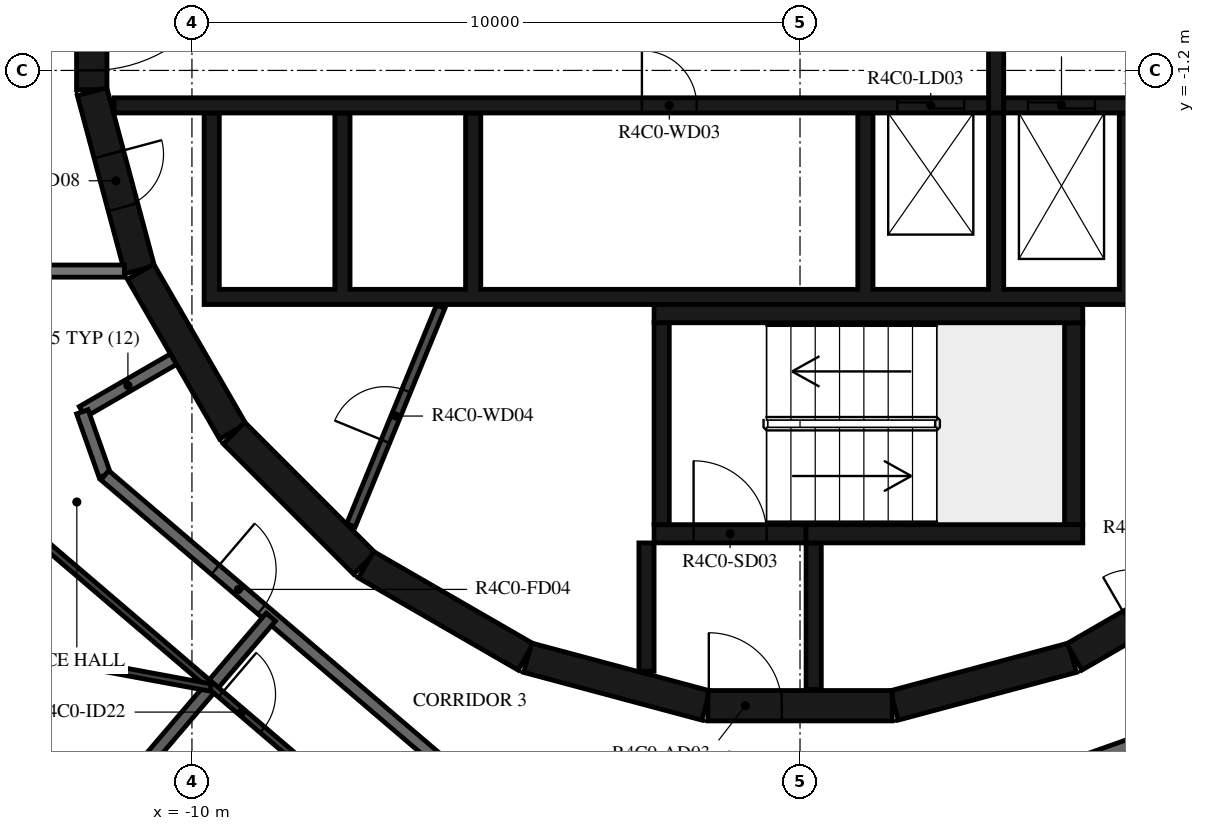
"""IFC4 building model, lengths in metres.
Left out: names, types, materials, properties, quantities, classifications, styles, units other than length and angle.
Written with IfcOpenShell. Run it as: python <this file> out.ifc"""

import sys

from ifc_helpers import new_model, si_unit, direction, frame, frame_2d, origin, place, context, subcontext, project, spatial, polyline, rectangle, outline, extrude, element, fill, save


model = new_model("IFC4")
c1 = context("Model", 3, precision=1e-05, world=origin(), true_north=direction((0.0, 1.0)))
c2 = subcontext(c1, "Body", "Model", "MODEL_VIEW")
j1 = project(units=[si_unit("LENGTHUNIT", "METRE"), si_unit("PLANEANGLEUNIT", "RADIAN")], contexts=[c1])
p1 = place(None, origin())
s1 = spatial("IfcSite", under=j1, at=p1, CompositionType="ELEMENT")
p2 = place(p1, origin())
s2 = spatial("IfcBuilding", under=s1, at=p2, CompositionType="ELEMENT")
p3 = place(p2, frame((0.0, 0.0, 172.7)))
s3 = spatial("IfcBuildingStorey", under=s2, at=p3, CompositionType="ELEMENT", Elevation=172.7)
p4 = place(p3, frame((1.55, -11.643, 0.0), z_axis=(0.0, 0.0, 1.0), x_axis=(0.965948410781, 0.258734743916, 0.0)))
e1 = element("IfcWall", 1, at=p4, inside=s3, PredefinedType="SHEAR", context=c2, shape_type="SweptSolid", body=[
    extrude(rectangle(XDim=3.033, YDim=0.5, at=frame_2d((1.516, 0.0))), origin(), (0.0, 0.0, 1.0), 3.12),
])
p5 = place(p3, frame((4.51, -10.845, 0.0), z_axis=(0.0, 0.0, 1.0), x_axis=(0.865975092491, 0.500087131594, 0.0)))
e2 = element("IfcWall", 2, at=p5, inside=s3, PredefinedType="SHEAR", context=c2, shape_type="SweptSolid", body=[
    extrude(rectangle(XDim=3.033, YDim=0.5, at=frame_2d((1.516, 0.0))), origin(), (0.0, 0.0, 1.0), 3.12),
])
p6 = place(p5, frame((1.066, 0.0, 0.0)))
e3 = element("IfcOpeningElement", 3, at=p6, cuts=e2, PredefinedType="OPENING", context=c2, shape_type="SweptSolid", body=[
    extrude(rectangle(XDim=0.9, YDim=2.1, at=frame_2d((0.45, 1.05))), frame((0.0, 0.26, 0.0), z_axis=(0.0, -1.0, 0.0), x_axis=(1.0, 0.0, 0.0)), (0.0, 0.0, 1.0), 0.52),
])
p7 = place(p3, frame((-11.647, 1.516, 0.0), z_axis=(0.0, 0.0, 1.0), x_axis=(0.0, -1.0, 0.0)))
e4 = element("IfcWall", 4, at=p7, inside=s3, PredefinedType="SHEAR", context=c2, shape_type="SweptSolid", body=[
    extrude(rectangle(XDim=3.033, YDim=0.5, at=frame_2d((1.516, 0.0))), origin(), (0.0, 0.0, 1.0), 3.12),
])
p8 = place(p7, frame((0.316, 0.0, 0.0)))
e5 = element("IfcOpeningElement", 5, at=p8, cuts=e4, PredefinedType="OPENING", context=c2, shape_type="SweptSolid", body=[
    extrude(rectangle(XDim=2.4, YDim=2.1, at=frame_2d((1.2, 1.05))), frame((0.0, 0.26, 0.0), z_axis=(0.0, -1.0, 0.0), x_axis=(1.0, 0.0, 0.0)), (0.0, 0.0, 1.0), 0.52),
])
p9 = place(p3, frame((-11.643, -1.55, 0.0), z_axis=(0.0, 0.0, 1.0), x_axis=(0.258734743916, -0.965948410781, 0.0)))
e6 = element("IfcWall", 6, at=p9, inside=s3, PredefinedType="SHEAR", context=c2, shape_type="SweptSolid", body=[
    extrude(rectangle(XDim=3.033, YDim=0.5, at=frame_2d((1.516, 0.0))), origin(), (0.0, 0.0, 1.0), 3.12),
])
p10 = place(p9, frame((1.066, 0.0, 0.0)))
e7 = element("IfcOpeningElement", 7, at=p10, cuts=e6, PredefinedType="OPENING", context=c2, shape_type="SweptSolid", body=[
    extrude(rectangle(XDim=0.9, YDim=2.1, at=frame_2d((0.45, 1.05))), frame((0.0, 0.26, 0.0), z_axis=(0.0, -1.0, 0.0), x_axis=(1.0, 0.0, 0.0)), (0.0, 0.0, 1.0), 0.52),
])
p11 = place(p3, frame((-10.845, -4.51, 0.0), z_axis=(0.0, 0.0, 1.0), x_axis=(0.500087131594, -0.865975092491, 0.0)))
e8 = element("IfcWall", 8, at=p11, inside=s3, PredefinedType="SHEAR", context=c2, shape_type="SweptSolid", body=[
    extrude(rectangle(XDim=3.033, YDim=0.5, at=frame_2d((1.516, 0.0))), origin(), (0.0, 0.0, 1.0), 3.12),
])
p12 = place(p3, frame((-9.308, -7.164, 0.0), z_axis=(0.0, 0.0, 1.0), x_axis=(0.707106781187, -0.707106781187, 0.0)))
e9 = element("IfcWall", 9, at=p12, inside=s3, PredefinedType="SHEAR", context=c2, shape_type="SweptSolid", body=[
    extrude(rectangle(XDim=3.032, YDim=0.5, at=frame_2d((1.516, 0.0))), origin(), (0.0, 0.0, 1.0), 3.12),
])
for number, where, z_axis, x_axis in (
    (10, (-7.137, -9.329, 0.0), (0.0, 0.0, 1.0), (0.866, -0.5, 0.0)),
    (11, (-4.479, -10.858, 0.0), (0.0, 0.0, 1.0), (0.966, -0.259, 0.0)),
):
    element("IfcWall", number, at=place(p3, frame(where, z_axis=z_axis, x_axis=x_axis)), inside=s3, PredefinedType="SHEAR", context=c2, shape_type="SweptSolid", body=[
        extrude(rectangle(XDim=3.033, YDim=0.5, at=frame_2d((1.516, 0.0))), origin(), (0.0, 0.0, 1.0), 3.12),
    ])
p13 = place(p3, frame((-1.516, -11.647, 0.0), z_axis=(0.0, 0.0, 1.0), x_axis=(1.0, 0.0, 0.0)))
e12 = element("IfcWall", 12, at=p13, inside=s3, PredefinedType="SHEAR", context=c2, shape_type="SweptSolid", body=[
    extrude(rectangle(XDim=3.033, YDim=0.5, at=frame_2d((1.516, 0.0))), origin(), (0.0, 0.0, 1.0), 3.12),
])
p14 = place(p13, frame((0.016, 0.0, 0.0)))
e13 = element("IfcOpeningElement", 13, at=p14, cuts=e12, PredefinedType="OPENING", context=c2, shape_type="SweptSolid", body=[
    extrude(rectangle(XDim=1.2, YDim=2.1, at=frame_2d((0.6, 1.05))), frame((0.0, 0.26, 0.0), z_axis=(0.0, -1.0, 0.0), x_axis=(1.0, 0.0, 0.0)), (0.0, 0.0, 1.0), 0.52),
])
p15 = place(p3, frame((-2.275, -8.67, 0.0), z_axis=(0.0, 0.0, 1.0), x_axis=(0.0, 1.0, 0.0)))
e14 = element("IfcWall", 14, at=p15, inside=s3, PredefinedType="SHEAR", context=c2, shape_type="SweptSolid", body=[
    extrude(rectangle(XDim=3.32, YDim=0.25, at=frame_2d((1.66, 0.0))), origin(), (0.0, 0.0, 1.0), 3.12),
])
p16 = place(p3, frame((-2.4, -5.2, 0.0), z_axis=(0.0, 0.0, 1.0), x_axis=(1.0, 0.0, 0.0)))
e15 = element("IfcWall", 15, at=p16, inside=s3, PredefinedType="SHEAR", context=c2, shape_type="SweptSolid", body=[
    extrude(rectangle(XDim=7.05, YDim=0.3, at=frame_2d((3.525, 0.0))), origin(), (0.0, 0.0, 1.0), 3.12),
])
p17 = place(p3, frame((4.5, -8.67, 0.0), z_axis=(0.0, 0.0, 1.0), x_axis=(0.0, 1.0, 0.0)))
e16 = element("IfcWall", 16, at=p17, inside=s3, PredefinedType="SHEAR", context=c2, shape_type="SweptSolid", body=[
    extrude(rectangle(XDim=3.32, YDim=0.3, at=frame_2d((1.66, 0.0))), origin(), (0.0, 0.0, 1.0), 3.12),
])
p18 = place(p3, frame((0.1, -8.82, 0.0), z_axis=(0.0, 0.0, 1.0), x_axis=(1.0, 0.0, 0.0)))
e17 = element("IfcWall", 17, at=p18, inside=s3, PredefinedType="SHEAR", context=c2, shape_type="SweptSolid", body=[
    extrude(rectangle(XDim=4.55, YDim=0.3, at=frame_2d((2.275, 0.0))), origin(), (0.0, 0.0, 1.0), 3.12),
])
p19 = place(p3, frame((-2.4, -8.82, 0.0), z_axis=(0.0, 0.0, 1.0), x_axis=(1.0, 0.0, 0.0)))
e18 = element("IfcWall", 18, at=p19, inside=s3, PredefinedType="SHEAR", context=c2, shape_type="SweptSolid", body=[
    extrude(rectangle(XDim=2.5, YDim=0.3, at=frame_2d((1.25, 0.0))), origin(), (0.0, 0.0, 1.0), 3.12),
])
p20 = place(p19, frame((0.65, 0.0, 0.0)))
e19 = element("IfcOpeningElement", 19, at=p20, cuts=e18, PredefinedType="OPENING", context=c2, shape_type="SweptSolid", body=[
    extrude(rectangle(XDim=1.2, YDim=2.1, at=frame_2d((0.6, 1.05))), frame((0.0, 0.16, 0.0), z_axis=(0.0, -1.0, 0.0), x_axis=(1.0, 0.0, 0.0)), (0.0, 0.0, 1.0), 0.32),
])
p21 = place(p3, frame((-2.525, -8.97, 0.0), z_axis=(0.0, 0.0, 1.0), x_axis=(0.0, -1.0, 0.0)))
e20 = element("IfcWall", 20, at=p21, inside=s3, PredefinedType="SHEAR", context=c2, shape_type="SweptSolid", body=[
    extrude(rectangle(XDim=2.11, YDim=0.25, at=frame_2d((1.055, 0.0))), origin(), (0.0, 0.0, 1.0), 3.12),
])
p22 = place(p3, frame((0.225, -8.97, 0.0), z_axis=(0.0, 0.0, 1.0), x_axis=(0.0, -1.0, 0.0)))
e21 = element("IfcWall", 21, at=p22, inside=s3, PredefinedType="SHEAR", context=c2, shape_type="SweptSolid", body=[
    extrude(rectangle(XDim=2.41, YDim=0.25, at=frame_2d((1.205, 0.0))), origin(), (0.0, 0.0, 1.0), 3.12),
])
p23 = place(p3, origin())
e22 = element("IfcWall", 22, at=p23, inside=s3, PredefinedType="SHEAR", context=c2, shape_type="SweptSolid", body=[
    extrude(outline(polyline([(9.8, -5.05), (9.8, -4.8), (9.8, -1.9), (9.55, -1.9), (9.55, -4.8), (7.65, -4.8), (7.65, -1.9), (7.4, -1.9), (7.4, -4.8), (5.5, -4.8), (5.5, -1.9), (5.25, -1.9), (5.25, -4.8), (3.35, -4.8), (3.35, -1.9), (3.1, -1.9), (3.1, -4.8), (1.2, -4.8), (1.2, -1.9), (0.95, -1.9), (0.95, -4.8), (-5.25, -4.8), (-5.25, -1.9), (-5.5, -1.9), (-5.5, -4.8), (-7.4, -4.8), (-7.4, -1.9), (-7.65, -1.9), (-7.65, -4.8), (-9.55, -4.8), (-9.55, -1.9), (-9.8, -1.9), (-9.8, -4.8), (-9.8, -5.05), (9.8, -5.05)])), origin(), (0.0, 0.0, 1.0), 3.12),
])
p24 = place(p3, frame((-11.28, -1.775, 0.0), z_axis=(0.0, 0.0, 1.0), x_axis=(1.0, 0.0, 0.0)))
e23 = element("IfcWall", 23, at=p24, inside=s3, PredefinedType="SHEAR", context=c2, shape_type="SweptSolid", body=[
    extrude(rectangle(XDim=14.38, YDim=0.25, at=frame_2d((7.19, 0.0))), origin(), (0.0, 0.0, 1.0), 3.12),
])
p25 = place(p24, frame((12.88, 0.0, 0.0)))
e24 = element("IfcOpeningElement", 24, at=p25, cuts=e23, PredefinedType="OPENING", context=c2, shape_type="SweptSolid", body=[
    extrude(rectangle(XDim=1.1, YDim=2.1, at=frame_2d((0.55, 1.05))), frame((0.0, 0.135, 0.0), z_axis=(0.0, -1.0, 0.0), x_axis=(1.0, 0.0, 0.0)), (0.0, 0.0, 1.0), 0.27),
])
p26 = place(p24, frame((8.68, 0.0, 0.0)))
e25 = element("IfcOpeningElement", 25, at=p26, cuts=e23, PredefinedType="OPENING", context=c2, shape_type="SweptSolid", body=[
    extrude(rectangle(XDim=0.9, YDim=2.1, at=frame_2d((0.45, 1.05))), frame((0.0, 0.135, 0.0), z_axis=(0.0, -1.0, 0.0), x_axis=(1.0, 0.0, 0.0)), (0.0, 0.0, 1.0), 0.27),
])
p27 = place(p3, frame((3.35, -1.775, 0.0), z_axis=(0.0, 0.0, 1.0), x_axis=(1.0, 0.0, 0.0)))
e26 = element("IfcWall", 26, at=p27, inside=s3, PredefinedType="SHEAR", context=c2, shape_type="SweptSolid", body=[
    extrude(rectangle(XDim=7.93, YDim=0.25, at=frame_2d((3.965, 0.0))), origin(), (0.0, 0.0, 1.0), 3.12),
])
p28 = place(p27, frame((0.4, 0.0, 0.0)))
e27 = element("IfcOpeningElement", 27, at=p28, cuts=e26, PredefinedType="OPENING", context=c2, shape_type="SweptSolid", body=[
    extrude(rectangle(XDim=1.1, YDim=2.4, at=frame_2d((0.55, 1.2))), frame((0.0, 0.135, 0.0), z_axis=(0.0, -1.0, 0.0), x_axis=(1.0, 0.0, 0.0)), (0.0, 0.0, 1.0), 0.27),
])
p29 = place(p27, frame((2.55, 0.0, 0.0)))
e28 = element("IfcOpeningElement", 28, at=p29, cuts=e26, PredefinedType="OPENING", context=c2, shape_type="SweptSolid", body=[
    extrude(rectangle(XDim=1.1, YDim=2.4, at=frame_2d((0.55, 1.2))), frame((0.0, 0.135, 0.0), z_axis=(0.0, -1.0, 0.0), x_axis=(1.0, 0.0, 0.0)), (0.0, 0.0, 1.0), 0.27),
])
p30 = place(p27, frame((4.7, 0.0, 0.0)))
e29 = element("IfcOpeningElement", 29, at=p30, cuts=e26, PredefinedType="OPENING", context=c2, shape_type="SweptSolid", body=[
    extrude(rectangle(XDim=1.1, YDim=2.4, at=frame_2d((0.55, 1.2))), frame((0.0, 0.135, 0.0), z_axis=(0.0, -1.0, 0.0), x_axis=(1.0, 0.0, 0.0)), (0.0, 0.0, 1.0), 0.27),
])
p31 = place(p3, frame((3.225, -1.9, 0.0), z_axis=(0.0, 0.0, 1.0), x_axis=(0.0, 1.0, 0.0)))
e30 = element("IfcWall", 30, at=p31, inside=s3, PredefinedType="SHEAR", context=c2, shape_type="SweptSolid", body=[
    extrude(rectangle(XDim=3.8, YDim=0.25, at=frame_2d((1.9, 0.0))), origin(), (0.0, 0.0, 1.0), 3.12),
])
p32 = place(p3, frame((-7.385, -8.681, 0.0), z_axis=(0.0, 0.0, 1.0), x_axis=(0.379804590409, 0.925066739811, 0.0)))
e31 = element("IfcWall", 31, at=p32, inside=s3, PredefinedType="PARTITIONING", context=c2, shape_type="SweptSolid", body=[
    extrude(rectangle(XDim=3.885, YDim=0.15, at=frame_2d((1.942, 0.0))), origin(), (0.0, 0.0, 1.0), 3.12),
])
p33 = place(p32, frame((1.493, 0.0, 0.0)))
e32 = element("IfcOpeningElement", 32, at=p33, cuts=e31, PredefinedType="OPENING", context=c2, shape_type="SweptSolid", body=[
    extrude(rectangle(XDim=0.9, YDim=2.1, at=frame_2d((0.45, 1.05))), frame((0.0, 0.085, 0.0), z_axis=(0.0, -1.0, 0.0), x_axis=(1.0, 0.0, 0.0)), (0.0, 0.0, 1.0), 0.17),
])
p34 = place(p3, frame((-10.303, -5.949, 0.0), z_axis=(0.0, 0.0, 1.0), x_axis=(-0.866021168401, -0.500007335828, 0.0)))
e33 = element("IfcWall", 33, at=p34, inside=s3, PredefinedType="STANDARD", context=c2, shape_type="SweptSolid", body=[
    extrude(rectangle(XDim=1.731, YDim=0.2, at=frame_2d((0.865, 0.0))), origin(), (0.0, 0.0, 1.0), 3.12),
])
p35 = place(p3, frame((-11.802, -6.814, 0.0), z_axis=(0.0, 0.0, 1.0), x_axis=(0.333904297771, -0.942606980629, 0.0)))
e34 = element("IfcWall", 34, at=p35, inside=s3, PredefinedType="STANDARD", context=c2, shape_type="SweptSolid", body=[
    extrude(rectangle(XDim=1.107, YDim=0.2, at=frame_2d((0.553, 0.0))), origin(), (0.0, 0.0, 1.0), 3.12),
])
p36 = place(p3, frame((-11.433, -7.858, 0.0), z_axis=(0.0, 0.0, 1.0), x_axis=(0.760412154545, -0.649440801937, 0.0)))
e35 = element("IfcWall", 35, at=p36, inside=s3, PredefinedType="STANDARD", context=c2, shape_type="SweptSolid", body=[
    extrude(rectangle(XDim=7.181, YDim=0.2, at=frame_2d((3.59, 0.0))), origin(), (0.0, 0.0, 1.0), 3.12),
])
p37 = place(p36, frame((2.39, 0.0, 0.0)))
e36 = element("IfcOpeningElement", 36, at=p37, cuts=e35, PredefinedType="OPENING", context=c2, shape_type="SweptSolid", body=[
    extrude(rectangle(XDim=1.0, YDim=2.1, at=frame_2d((0.5, 1.05))), frame((0.0, 0.11, 0.0), z_axis=(0.0, -1.0, 0.0), x_axis=(1.0, 0.0, 0.0)), (0.0, 0.0, 1.0), 0.22),
])
p38 = place(p3, frame((1.088, -13.83, 0.0), z_axis=(0.0, 0.0, 1.0), x_axis=(0.942648397945, 0.333787354241, 0.0)))
e37 = element("IfcWall", 37, at=p38, inside=s3, PredefinedType="STANDARD", context=c2, shape_type="SweptSolid", body=[
    extrude(rectangle(XDim=7.181, YDim=0.2, at=frame_2d((3.591, 0.0))), origin(), (0.0, 0.0, 1.0), 3.12),
])
p39 = place(p38, frame((0.2, 0.0, 0.0)))
e38 = element("IfcOpeningElement", 38, at=p39, cuts=e37, PredefinedType="OPENING", context=c2, shape_type="SweptSolid", body=[
    extrude(rectangle(XDim=1.0, YDim=2.1, at=frame_2d((0.5, 1.05))), frame((0.0, 0.11, 0.0), z_axis=(0.0, -1.0, 0.0), x_axis=(1.0, 0.0, 0.0)), (0.0, 0.0, 1.0), 0.22),
])
p40 = place(p3, frame((-17.9, -4.5, 0.0), z_axis=(0.0, 0.0, 1.0), x_axis=(1.0, 0.0, 0.0)))
e39 = element("IfcWall", 39, at=p40, inside=s3, PredefinedType="STANDARD", context=c2, shape_type="SweptSolid", body=[
    extrude(rectangle(XDim=6.789, YDim=0.2, at=frame_2d((3.394, 0.0))), origin(), (0.0, 0.0, 1.0), 3.12),
])
p41 = place(p3, frame((-11.838, -13.86, 0.0), z_axis=(0.0, 0.0, 1.0), x_axis=(0.64944503311, 0.760408540831, 0.0)))
e40 = element("IfcWall", 40, at=p41, inside=s3, PredefinedType="STANDARD", context=c2, shape_type="SweptSolid", body=[
    extrude(rectangle(XDim=4.827, YDim=0.2, at=frame_2d((2.414, 0.0))), origin(), (0.0, 0.0, 1.0), 3.12),
])
p42 = place(p3, frame((-12.713, -8.737, 0.0), z_axis=(0.0, 0.0, 1.0), x_axis=(0.760432387723, -0.649417110725, 0.0)))
e41 = element("IfcWall", 41, at=p42, inside=s3, PredefinedType="PARTITIONING", context=c2, shape_type="SweptSolid", body=[
    extrude(rectangle(XDim=6.032, YDim=0.12, at=frame_2d((3.016, 0.0))), origin(), (0.0, 0.0, 1.0), 3.12),
])
p43 = place(p42, frame((4.192, 0.0, 0.0)))
e42 = element("IfcOpeningElement", 42, at=p43, cuts=e41, PredefinedType="OPENING", context=c2, shape_type="SweptSolid", body=[
    extrude(rectangle(XDim=0.9, YDim=2.1, at=frame_2d((0.45, 1.05))), frame((0.0, 0.07, 0.0), z_axis=(0.0, -1.0, 0.0), x_axis=(1.0, 0.0, 0.0)), (0.0, 0.0, 1.0), 0.14),
])
p44 = place(p3, frame((-16.252, -10.133, 0.0), z_axis=(0.0, 0.0, 1.0), x_axis=(0.983256998026, -0.182224246005, 0.0)))
e43 = element("IfcWall", 43, at=p44, inside=s3, PredefinedType="PARTITIONING", context=c2, shape_type="SweptSolid", body=[
    extrude(rectangle(XDim=6.671, YDim=0.12, at=frame_2d((3.335, 0.0))), origin(), (0.0, 0.0, 1.0), 3.12),
])
p45 = place(p44, frame((0.2, 0.0, 0.0)))
e44 = element("IfcOpeningElement", 44, at=p45, cuts=e43, PredefinedType="OPENING", context=c2, shape_type="SweptSolid", body=[
    extrude(rectangle(XDim=0.9, YDim=2.1, at=frame_2d((0.45, 1.05))), frame((0.0, 0.07, 0.0), z_axis=(0.0, -1.0, 0.0), x_axis=(1.0, 0.0, 0.0)), (0.0, 0.0, 1.0), 0.14),
])
p46 = place(p20, origin())
e45 = element("IfcDoor", 45, at=p46, inside=s3, OperationType="SINGLE_SWING_LEFT", PredefinedType="DOOR", context=c2, shape_type="SweptSolid", body=[
    extrude(rectangle(XDim=1.2, YDim=2.1, at=frame_2d((0.6, 1.05))), frame((0.0, 0.025, 0.0), z_axis=(0.0, -1.0, 0.0), x_axis=(1.0, 0.0, 0.0)), (0.0, 0.0, 1.0), 0.05),
])
fill(e19, e45)
p47 = place(p14, origin())
e46 = element("IfcDoor", 46, at=p47, inside=s3, OperationType="SINGLE_SWING_RIGHT", PredefinedType="DOOR", context=c2, shape_type="SweptSolid", body=[
    extrude(rectangle(XDim=1.2, YDim=2.1, at=frame_2d((0.6, 1.05))), frame((0.0, 0.025, 0.0), z_axis=(0.0, -1.0, 0.0), x_axis=(1.0, 0.0, 0.0)), (0.0, 0.0, 1.0), 0.05),
])
fill(e13, e46)
p48 = place(p8, origin())
e47 = element("IfcDoor", 47, at=p48, inside=s3, OperationType="DOUBLE_DOOR_SINGLE_SWING", PredefinedType="DOOR", context=c2, shape_type="SweptSolid", body=[
    extrude(rectangle(XDim=2.4, YDim=2.1, at=frame_2d((1.2, 1.05))), frame((0.0, 0.025, 0.0), z_axis=(0.0, -1.0, 0.0), x_axis=(1.0, 0.0, 0.0)), (0.0, 0.0, 1.0), 0.05),
])
fill(e5, e47)
p49 = place(p25, origin())
e48 = element("IfcDoor", 48, at=p49, inside=s3, OperationType="DOUBLE_DOOR_SLIDING", PredefinedType="DOOR", context=c2, shape_type="SweptSolid", body=[
    extrude(rectangle(XDim=1.1, YDim=2.1, at=frame_2d((0.55, 1.05))), frame((0.0, 0.025, 0.0), z_axis=(0.0, -1.0, 0.0), x_axis=(1.0, 0.0, 0.0)), (0.0, 0.0, 1.0), 0.05),
])
fill(e24, e48)
p50 = place(p28, origin())
e49 = element("IfcDoor", 49, at=p50, inside=s3, OperationType="DOUBLE_DOOR_SLIDING", PredefinedType="DOOR", context=c2, shape_type="SweptSolid", body=[
    extrude(rectangle(XDim=1.1, YDim=2.4, at=frame_2d((0.55, 1.2))), frame((0.0, 0.025, 0.0), z_axis=(0.0, -1.0, 0.0), x_axis=(1.0, 0.0, 0.0)), (0.0, 0.0, 1.0), 0.05),
])
fill(e27, e49)
p51 = place(p26, origin())
e50 = element("IfcDoor", 50, at=p51, inside=s3, OperationType="SINGLE_SWING_LEFT", PredefinedType="DOOR", context=c2, shape_type="SweptSolid", body=[
    extrude(rectangle(XDim=0.9, YDim=2.1, at=frame_2d((0.45, 1.05))), frame((0.0, 0.025, 0.0), z_axis=(0.0, -1.0, 0.0), x_axis=(1.0, 0.0, 0.0)), (0.0, 0.0, 1.0), 0.05),
])
fill(e25, e50)
p52 = place(p33, origin())
e51 = element("IfcDoor", 51, at=p52, inside=s3, OperationType="SINGLE_SWING_RIGHT", PredefinedType="DOOR", context=c2, shape_type="SweptSolid", body=[
    extrude(rectangle(XDim=0.9, YDim=2.1, at=frame_2d((0.45, 1.05))), frame((0.0, 0.025, 0.0), z_axis=(0.0, -1.0, 0.0), x_axis=(1.0, 0.0, 0.0)), (0.0, 0.0, 1.0), 0.05),
])
fill(e32, e51)
p53 = place(p10, origin())
e52 = element("IfcDoor", 52, at=p53, inside=s3, OperationType="SINGLE_SWING_RIGHT", PredefinedType="DOOR", context=c2, shape_type="SweptSolid", body=[
    extrude(rectangle(XDim=0.9, YDim=2.1, at=frame_2d((0.45, 1.05))), frame((0.0, 0.025, 0.0), z_axis=(0.0, -1.0, 0.0), x_axis=(1.0, 0.0, 0.0)), (0.0, 0.0, 1.0), 0.05),
])
fill(e7, e52)
p54 = place(p37, origin())
e53 = element("IfcDoor", 53, at=p54, inside=s3, OperationType="SINGLE_SWING_RIGHT", PredefinedType="DOOR", context=c2, shape_type="SweptSolid", body=[
    extrude(rectangle(XDim=1.0, YDim=2.1, at=frame_2d((0.5, 1.05))), frame((0.0, 0.025, 0.0), z_axis=(0.0, -1.0, 0.0), x_axis=(1.0, 0.0, 0.0)), (0.0, 0.0, 1.0), 0.05),
])
fill(e36, e53)
p55 = place(p43, origin())
e54 = element("IfcDoor", 54, at=p55, inside=s3, OperationType="SINGLE_SWING_LEFT", PredefinedType="DOOR", context=c2, shape_type="SweptSolid", body=[
    extrude(rectangle(XDim=0.9, YDim=2.1, at=frame_2d((0.45, 1.05))), frame((0.0, 0.025, 0.0), z_axis=(0.0, -1.0, 0.0), x_axis=(1.0, 0.0, 0.0)), (0.0, 0.0, 1.0), 0.05),
])
fill(e42, e54)
save(model, sys.argv[1])
